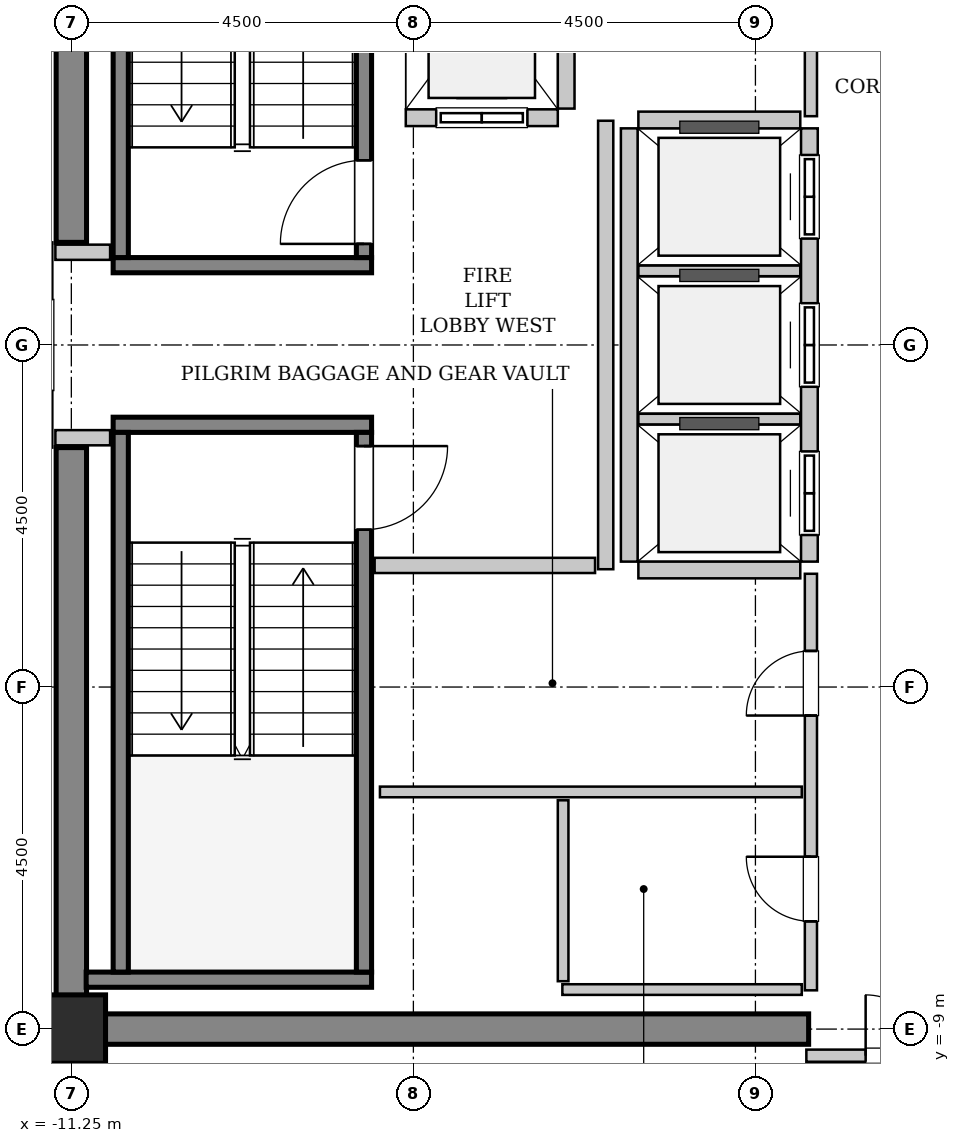
"""IFC4 building model, lengths in metres.
Left out: names, types, materials, properties, quantities, classifications, styles, units other than length and angle.
Written with IfcOpenShell. Run it as: python <this file> out.ifc"""

import sys

from ifc_helpers import new_model, si_unit, direction, frame, frame_2d, origin, origin_2d, place, context, subcontext, project, spatial, rectangle, extrude, source, transform, mapped, element, fill, save


model = new_model("IFC4")
c1 = context("Model", 3, precision=1e-05, world=origin(), true_north=direction((0.0, 1.0)))
c2 = subcontext(c1, "Body", "Model", "MODEL_VIEW")
j1 = project(units=[si_unit("LENGTHUNIT", "METRE"), si_unit("PLANEANGLEUNIT", "RADIAN")], contexts=[c1])
p1 = place(None, origin())
s1 = spatial("IfcSite", under=j1, at=p1, CompositionType="ELEMENT")
p2 = place(p1, origin())
s2 = spatial("IfcBuilding", under=s1, at=p2, CompositionType="ELEMENT")
p3 = place(p2, frame((0.0, 0.0, 337.6)))
s3 = spatial("IfcBuildingStorey", under=s2, at=p3, CompositionType="ELEMENT", Elevation=337.6)
m1 = source(origin(), c2, "Body", "SweptSolid", [
    extrude(rectangle(XDim=9.9, YDim=0.4, at=frame_2d((4.95, 0.0))), origin(), (0.0, 0.0, 1.0), 3.8),
])
p4 = place(p3, frame((-11.45, -9.0, 0.0), z_axis=(0.0, 0.0, 1.0), x_axis=(1.0, 0.0, 0.0)))
e1 = element("IfcWall", 1, at=p4, inside=s3, PredefinedType="SHEAR", context=c2, shape_type="MappedRepresentation", body=[
    mapped(m1, transform((0.0, 0.0, 0.0), x_axis=(1.0, 0.0, 0.0), y_axis=(0.0, 1.0, 0.0), z_axis=(0.0, 0.0, 1.0), scale=1.0)),
])
m2 = source(origin(), c2, "Body", "SweptSolid", [
    extrude(rectangle(XDim=7.45, YDim=0.4, at=frame_2d((3.725, 0.0))), origin(), (0.0, 0.0, 1.0), 3.8),
])
for number, where, z_axis, x_axis in (
    (2, (-11.25, -8.8, 0.0), (0.0, 0.0, 1.0), (0.0, 1.0, 0.0)),
    (3, (-11.25, 1.35, 0.0), (0.0, 0.0, 1.0), (0.0, 1.0, 0.0)),
):
    element("IfcWall", number, at=place(p3, frame(where, z_axis=z_axis, x_axis=x_axis)), inside=s3, PredefinedType="SHEAR", context=c2, shape_type="MappedRepresentation", body=[
        mapped(m2, transform((0.0, 0.0, 0.0), x_axis=(1.0, 0.0, 0.0), y_axis=(0.0, 1.0, 0.0), z_axis=(0.0, 0.0, 1.0), scale=1.0)),
    ])
m3 = source(origin(), c2, "Body", "SweptSolid", [
    extrude(rectangle(XDim=0.9, YDim=0.9, at=origin_2d()), origin(), (0.0, 0.0, 1.0), 3.8),
])
p5 = place(p3, frame((-11.25, -9.0, 0.0), z_axis=(0.0, 0.0, 1.0), x_axis=(1.0, 0.0, 0.0)))
e4 = element("IfcColumn", 4, at=p5, inside=s3, PredefinedType="COLUMN", context=c2, shape_type="MappedRepresentation", body=[
    mapped(m3, transform((0.0, 0.0, 0.0), x_axis=(1.0, 0.0, 0.0), y_axis=(0.0, 1.0, 0.0), z_axis=(0.0, 0.0, 1.0), scale=1.0)),
])
m4 = source(origin(), c2, "Body", "SweptSolid", [
    extrude(rectangle(XDim=3.4, YDim=0.2, at=frame_2d((1.7, 0.0))), origin(), (0.0, 0.0, 1.0), 3.8),
])
p6 = place(p3, frame((-7.3, 1.05, 0.0), z_axis=(0.0, 0.0, 1.0), x_axis=(-1.0, 0.0, 0.0)))
e5 = element("IfcWall", 5, at=p6, inside=s3, PredefinedType="SOLIDWALL", context=c2, shape_type="MappedRepresentation", body=[
    mapped(m4, transform((0.0, 0.0, 0.0), x_axis=(1.0, 0.0, 0.0), y_axis=(0.0, 1.0, 0.0), z_axis=(0.0, 0.0, 1.0), scale=1.0)),
])
m5 = source(origin(), c2, "Body", "SweptSolid", [
    extrude(rectangle(XDim=7.1, YDim=0.2, at=frame_2d((3.55, 0.0))), origin(), (0.0, 0.0, 1.0), 3.8),
])
p7 = place(p3, frame((-7.4, 1.15, 0.0), z_axis=(0.0, 0.0, 1.0), x_axis=(0.0, 1.0, 0.0)))
e6 = element("IfcWall", 6, at=p7, inside=s3, PredefinedType="SOLIDWALL", context=c2, shape_type="MappedRepresentation", body=[
    mapped(m5, transform((0.0, 0.0, 0.0), x_axis=(1.0, 0.0, 0.0), y_axis=(0.0, 1.0, 0.0), z_axis=(0.0, 0.0, 1.0), scale=1.0)),
])
p8 = place(p7, frame((0.18, 0.0, 0.0)))
e7 = element("IfcOpeningElement", 7, at=p8, cuts=e6, PredefinedType="OPENING", context=c2, shape_type="SweptSolid", body=[
    extrude(rectangle(XDim=1.1, YDim=2.15, at=frame_2d((0.55, 1.075))), frame((0.0, 0.11, 0.0), z_axis=(0.0, -1.0, 0.0), x_axis=(1.0, 0.0, 0.0)), (0.0, 0.0, 1.0), 0.22),
])
p9 = place(p3, frame((-10.6, 1.15, 0.0), z_axis=(0.0, 0.0, 1.0), x_axis=(0.0, 1.0, 0.0)))
e8 = element("IfcWall", 8, at=p9, inside=s3, PredefinedType="SOLIDWALL", context=c2, shape_type="MappedRepresentation", body=[
    mapped(m5, transform((0.0, 0.0, 0.0), x_axis=(1.0, 0.0, 0.0), y_axis=(0.0, 1.0, 0.0), z_axis=(0.0, 0.0, 1.0), scale=1.0)),
])
p10 = place(p3, frame((-10.7, -1.05, 0.0), z_axis=(0.0, 0.0, 1.0), x_axis=(1.0, 0.0, 0.0)))
e9 = element("IfcWall", 9, at=p10, inside=s3, PredefinedType="SOLIDWALL", context=c2, shape_type="MappedRepresentation", body=[
    mapped(m4, transform((0.0, 0.0, 0.0), x_axis=(1.0, 0.0, 0.0), y_axis=(0.0, 1.0, 0.0), z_axis=(0.0, 0.0, 1.0), scale=1.0)),
])
m6 = source(origin(), c2, "Body", "SweptSolid", [
    extrude(rectangle(XDim=3.755, YDim=0.2, at=frame_2d((1.877, 0.0))), origin(), (0.0, 0.0, 1.0), 3.8),
])
p11 = place(p3, frame((-11.055, -8.35, 0.0), z_axis=(0.0, 0.0, 1.0), x_axis=(1.0, 0.0, 0.0)))
e10 = element("IfcWall", 10, at=p11, inside=s3, PredefinedType="SOLIDWALL", context=c2, shape_type="MappedRepresentation", body=[
    mapped(m6, transform((0.0, 0.0, 0.0), x_axis=(1.0, 0.0, 0.0), y_axis=(0.0, 1.0, 0.0), z_axis=(0.0, 0.0, 1.0), scale=1.0)),
])
p12 = place(p3, frame((-10.6, -1.15, 0.0), z_axis=(0.0, 0.0, 1.0), x_axis=(0.0, -1.0, 0.0)))
e11 = element("IfcWall", 11, at=p12, inside=s3, PredefinedType="SOLIDWALL", context=c2, shape_type="MappedRepresentation", body=[
    mapped(m5, transform((0.0, 0.0, 0.0), x_axis=(1.0, 0.0, 0.0), y_axis=(0.0, 1.0, 0.0), z_axis=(0.0, 0.0, 1.0), scale=1.0)),
])
p13 = place(p3, frame((-7.4, -1.15, 0.0), z_axis=(0.0, 0.0, 1.0), x_axis=(0.0, -1.0, 0.0)))
e12 = element("IfcWall", 12, at=p13, inside=s3, PredefinedType="SOLIDWALL", context=c2, shape_type="MappedRepresentation", body=[
    mapped(m5, transform((0.0, 0.0, 0.0), x_axis=(1.0, 0.0, 0.0), y_axis=(0.0, 1.0, 0.0), z_axis=(0.0, 0.0, 1.0), scale=1.0)),
])
p14 = place(p13, frame((0.18, 0.0, 0.0)))
e13 = element("IfcOpeningElement", 13, at=p14, cuts=e12, PredefinedType="OPENING", context=c2, shape_type="SweptSolid", body=[
    extrude(rectangle(XDim=1.1, YDim=2.15, at=frame_2d((0.55, 1.075))), frame((0.0, 0.11, 0.0), z_axis=(0.0, -1.0, 0.0), x_axis=(1.0, 0.0, 0.0)), (0.0, 0.0, 1.0), 0.22),
])
m7 = source(origin(), c2, "Body", "SweptSolid", [
    extrude(rectangle(XDim=2.0, YDim=0.22, at=frame_2d((1.0, 0.0))), origin(), (0.0, 0.0, 1.0), 3.535),
])
p15 = place(p3, frame((-6.85, 2.99, 0.0), z_axis=(0.0, 0.0, 1.0), x_axis=(1.0, 0.0, 0.0)))
e14 = element("IfcWall", 14, at=p15, inside=s3, PredefinedType="SOLIDWALL", context=c2, shape_type="MappedRepresentation", body=[
    mapped(m7, transform((0.0, 0.0, 0.0), x_axis=(1.0, 0.0, 0.0), y_axis=(0.0, 1.0, 0.0), z_axis=(0.0, 0.0, 1.0), scale=1.0)),
])
p16 = place(p15, frame((0.4, 0.0, 0.0)))
e15 = element("IfcOpeningElement", 15, at=p16, cuts=e14, PredefinedType="OPENING", context=c2, shape_type="SweptSolid", body=[
    extrude(rectangle(XDim=1.2, YDim=2.2, at=frame_2d((0.6, 1.1))), frame((0.0, 0.12, 0.0), z_axis=(0.0, -1.0, 0.0), x_axis=(1.0, 0.0, 0.0)), (0.0, 0.0, 1.0), 0.24),
])
m8 = source(origin(), c2, "Body", "SweptSolid", [
    extrude(rectangle(XDim=2.68, YDim=0.22, at=frame_2d((1.34, 0.0))), origin(), (0.0, 0.0, 1.0), 3.535),
])
p17 = place(p3, frame((-4.74, 3.11, 0.0), z_axis=(0.0, 0.0, 1.0), x_axis=(0.0, 1.0, 0.0)))
e16 = element("IfcWall", 16, at=p17, inside=s3, PredefinedType="SOLIDWALL", context=c2, shape_type="MappedRepresentation", body=[
    mapped(m8, transform((0.0, 0.0, 0.0), x_axis=(1.0, 0.0, 0.0), y_axis=(0.0, 1.0, 0.0), z_axis=(0.0, 0.0, 1.0), scale=1.0)),
])
m9 = source(origin(), c2, "Body", "SweptSolid", [
    extrude(rectangle(XDim=5.7, YDim=0.22, at=frame_2d((2.85, 0.0))), origin(), (0.0, 0.0, 1.0), 3.535),
])
p18 = place(p3, frame((-1.54, -2.85, 0.0), z_axis=(0.0, 0.0, 1.0), x_axis=(0.0, 1.0, 0.0)))
e17 = element("IfcWall", 17, at=p18, inside=s3, PredefinedType="SOLIDWALL", context=c2, shape_type="MappedRepresentation", body=[
    mapped(m9, transform((0.0, 0.0, 0.0), x_axis=(1.0, 0.0, 0.0), y_axis=(0.0, 1.0, 0.0), z_axis=(0.0, 0.0, 1.0), scale=1.0)),
])
p19 = place(p18, frame((0.35, 0.0, 0.0)))
e18 = element("IfcOpeningElement", 18, at=p19, cuts=e17, PredefinedType="OPENING", context=c2, shape_type="SweptSolid", body=[
    extrude(rectangle(XDim=1.1, YDim=2.2, at=frame_2d((0.55, 1.1))), frame((0.0, 0.12, 0.0), z_axis=(0.0, -1.0, 0.0), x_axis=(1.0, 0.0, 0.0)), (0.0, 0.0, 1.0), 0.24),
])
p20 = place(p18, frame((2.3, 0.0, 0.0)))
e19 = element("IfcOpeningElement", 19, at=p20, cuts=e17, PredefinedType="OPENING", context=c2, shape_type="SweptSolid", body=[
    extrude(rectangle(XDim=1.1, YDim=2.2, at=frame_2d((0.55, 1.1))), frame((0.0, 0.12, 0.0), z_axis=(0.0, -1.0, 0.0), x_axis=(1.0, 0.0, 0.0)), (0.0, 0.0, 1.0), 0.24),
])
p21 = place(p18, frame((4.25, 0.0, 0.0)))
e20 = element("IfcOpeningElement", 20, at=p21, cuts=e17, PredefinedType="OPENING", context=c2, shape_type="SweptSolid", body=[
    extrude(rectangle(XDim=1.1, YDim=2.2, at=frame_2d((0.55, 1.1))), frame((0.0, 0.12, 0.0), z_axis=(0.0, -1.0, 0.0), x_axis=(1.0, 0.0, 0.0)), (0.0, 0.0, 1.0), 0.24),
])
p22 = place(p3, frame((-3.91, 2.85, 0.0), z_axis=(0.0, 0.0, 1.0), x_axis=(0.0, -1.0, 0.0)))
e21 = element("IfcWall", 21, at=p22, inside=s3, PredefinedType="SOLIDWALL", context=c2, shape_type="MappedRepresentation", body=[
    mapped(m9, transform((0.0, 0.0, 0.0), x_axis=(1.0, 0.0, 0.0), y_axis=(0.0, 1.0, 0.0), z_axis=(0.0, 0.0, 1.0), scale=1.0)),
])
m10 = source(origin(), c2, "Body", "SweptSolid", [
    extrude(rectangle(XDim=2.13, YDim=0.22, at=frame_2d((1.065, 0.0))), origin(), (0.0, 0.0, 1.0), 3.535),
])
p23 = place(p3, frame((-3.79, -2.96, 0.0), z_axis=(0.0, 0.0, 1.0), x_axis=(1.0, 0.0, 0.0)))
e22 = element("IfcWall", 22, at=p23, inside=s3, PredefinedType="SOLIDWALL", context=c2, shape_type="MappedRepresentation", body=[
    mapped(m10, transform((0.0, 0.0, 0.0), x_axis=(1.0, 0.0, 0.0), y_axis=(0.0, 1.0, 0.0), z_axis=(0.0, 0.0, 1.0), scale=1.0)),
])
m11 = source(origin(), c2, "Body", "SweptSolid", [
    extrude(rectangle(XDim=2.13, YDim=0.14, at=frame_2d((1.065, 0.0))), origin(), (0.0, 0.0, 1.0), 3.535),
])
for number, where, z_axis, x_axis in (
    (23, (-3.79, -0.975, 0.0), (0.0, 0.0, 1.0), (1.0, 0.0, 0.0)),
    (24, (-3.79, 0.975, 0.0), (0.0, 0.0, 1.0), (1.0, 0.0, 0.0)),
):
    element("IfcWall", number, at=place(p3, frame(where, z_axis=z_axis, x_axis=x_axis)), inside=s3, PredefinedType="PARTITIONING", context=c2, shape_type="MappedRepresentation", body=[
        mapped(m11, transform((0.0, 0.0, 0.0), x_axis=(1.0, 0.0, 0.0), y_axis=(0.0, 1.0, 0.0), z_axis=(0.0, 0.0, 1.0), scale=1.0)),
    ])
p24 = place(p3, frame((-1.66, 2.96, 0.0), z_axis=(0.0, 0.0, 1.0), x_axis=(-1.0, 0.0, 0.0)))
e25 = element("IfcWall", 25, at=p24, inside=s3, PredefinedType="SOLIDWALL", context=c2, shape_type="MappedRepresentation", body=[
    mapped(m10, transform((0.0, 0.0, 0.0), x_axis=(1.0, 0.0, 0.0), y_axis=(0.0, 1.0, 0.0), z_axis=(0.0, 0.0, 1.0), scale=1.0)),
])
m12 = source(origin(), c2, "Body", "SweptSolid", [
    extrude(rectangle(XDim=5.9, YDim=0.2, at=frame_2d((2.95, 0.0))), origin(), (0.0, 0.0, 1.0), 3.535),
])
p25 = place(p3, frame((-4.22, -2.95, 0.0), z_axis=(0.0, 0.0, 1.0), x_axis=(0.0, 1.0, 0.0)))
e26 = element("IfcWall", 26, at=p25, inside=s3, PredefinedType="PARTITIONING", context=c2, shape_type="MappedRepresentation", body=[
    mapped(m12, transform((0.0, 0.0, 0.0), x_axis=(1.0, 0.0, 0.0), y_axis=(0.0, 1.0, 0.0), z_axis=(0.0, 0.0, 1.0), scale=1.0)),
])
m13 = source(origin(), c2, "Body", "SweptSolid", [
    extrude(rectangle(XDim=2.9, YDim=0.2, at=frame_2d((1.45, 0.0))), origin(), (0.0, 0.0, 1.0), 3.535),
])
p26 = place(p3, frame((-7.26, -2.9, 0.0), z_axis=(0.0, 0.0, 1.0), x_axis=(1.0, 0.0, 0.0)))
e27 = element("IfcWall", 27, at=p26, inside=s3, PredefinedType="PARTITIONING", context=c2, shape_type="MappedRepresentation", body=[
    mapped(m13, transform((0.0, 0.0, 0.0), x_axis=(1.0, 0.0, 0.0), y_axis=(0.0, 1.0, 0.0), z_axis=(0.0, 0.0, 1.0), scale=1.0)),
])
m14 = source(origin(), c2, "Body", "SweptSolid", [
    extrude(rectangle(XDim=0.72, YDim=0.2, at=frame_2d((0.36, 0.0))), origin(), (0.0, 0.0, 1.0), 3.535),
])
for number, where, z_axis, x_axis in (
    (28, (-11.46, 1.22, 0.0), (0.0, 0.0, 1.0), (1.0, 0.0, 0.0)),
    (29, (-11.46, -1.22, 0.0), (0.0, 0.0, 1.0), (1.0, 0.0, 0.0)),
):
    element("IfcWall", number, at=place(p3, frame(where, z_axis=z_axis, x_axis=x_axis)), inside=s3, PredefinedType="PARTITIONING", context=c2, shape_type="MappedRepresentation", body=[
        mapped(m14, transform((0.0, 0.0, 0.0), x_axis=(1.0, 0.0, 0.0), y_axis=(0.0, 1.0, 0.0), z_axis=(0.0, 0.0, 1.0), scale=1.0)),
    ])
m15 = source(origin(), c2, "Body", "SweptSolid", [
    extrude(rectangle(XDim=3.16, YDim=0.16, at=frame_2d((1.58, 0.0))), origin(), (0.0, 0.0, 1.0), 2.625),
])
p27 = place(p3, frame((-1.58, -9.35, 0.0), z_axis=(0.0, 0.0, 1.0), x_axis=(1.0, 0.0, 0.0)))
e30 = element("IfcWall", 30, at=p27, inside=s3, PredefinedType="PARTITIONING", context=c2, shape_type="MappedRepresentation", body=[
    mapped(m15, transform((0.0, 0.0, 0.0), x_axis=(1.0, 0.0, 0.0), y_axis=(0.0, 1.0, 0.0), z_axis=(0.0, 0.0, 1.0), scale=1.0)),
])
p28 = place(p27, frame((0.78, 0.0, 0.0)))
e31 = element("IfcOpeningElement", 31, at=p28, cuts=e30, PredefinedType="OPENING", context=c2, shape_type="SweptSolid", body=[
    extrude(rectangle(XDim=1.6, YDim=2.3, at=frame_2d((0.8, 1.15))), frame((0.0, 0.09, 0.0), z_axis=(0.0, -1.0, 0.0), x_axis=(1.0, 0.0, 0.0)), (0.0, 0.0, 1.0), 0.18),
])
m16 = source(origin(), c2, "Body", "SweptSolid", [
    extrude(rectangle(XDim=5.48, YDim=0.16, at=frame_2d((2.74, 0.0))), origin(), (0.0, 0.0, 1.0), 3.535),
])
p29 = place(p3, frame((-1.52, 3.01, 0.0), z_axis=(0.0, 0.0, 1.0), x_axis=(0.0, 1.0, 0.0)))
e32 = element("IfcWall", 32, at=p29, inside=s3, PredefinedType="PARTITIONING", context=c2, shape_type="MappedRepresentation", body=[
    mapped(m16, transform((0.0, 0.0, 0.0), x_axis=(1.0, 0.0, 0.0), y_axis=(0.0, 1.0, 0.0), z_axis=(0.0, 0.0, 1.0), scale=1.0)),
])
p30 = place(p29, frame((2.315, 0.0, 0.0)))
e33 = element("IfcOpeningElement", 33, at=p30, cuts=e32, PredefinedType="OPENING", context=c2, shape_type="SweptSolid", body=[
    extrude(rectangle(XDim=0.85, YDim=2.1, at=frame_2d((0.425, 1.05))), frame((0.0, 0.09, 0.0), z_axis=(0.0, -1.0, 0.0), x_axis=(1.0, 0.0, 0.0)), (0.0, 0.0, 1.0), 0.18),
])
p31 = place(p3, frame((-1.52, -8.49, 0.0), z_axis=(0.0, 0.0, 1.0), x_axis=(0.0, 1.0, 0.0)))
e34 = element("IfcWall", 34, at=p31, inside=s3, PredefinedType="PARTITIONING", context=c2, shape_type="MappedRepresentation", body=[
    mapped(m16, transform((0.0, 0.0, 0.0), x_axis=(1.0, 0.0, 0.0), y_axis=(0.0, 1.0, 0.0), z_axis=(0.0, 0.0, 1.0), scale=1.0)),
])
p32 = place(p31, frame((0.907, 0.0, 0.0)))
e35 = element("IfcOpeningElement", 35, at=p32, cuts=e34, PredefinedType="OPENING", context=c2, shape_type="SweptSolid", body=[
    extrude(rectangle(XDim=0.85, YDim=2.1, at=frame_2d((0.425, 1.05))), frame((0.0, 0.09, 0.0), z_axis=(0.0, -1.0, 0.0), x_axis=(1.0, 0.0, 0.0)), (0.0, 0.0, 1.0), 0.18),
])
p33 = place(p31, frame((3.615, 0.0, 0.0)))
e36 = element("IfcOpeningElement", 36, at=p33, cuts=e34, PredefinedType="OPENING", context=c2, shape_type="SweptSolid", body=[
    extrude(rectangle(XDim=0.85, YDim=2.1, at=frame_2d((0.425, 1.05))), frame((0.0, 0.09, 0.0), z_axis=(0.0, -1.0, 0.0), x_axis=(1.0, 0.0, 0.0)), (0.0, 0.0, 1.0), 0.18),
])
m17 = source(origin(), c2, "Body", "SweptSolid", [
    extrude(rectangle(XDim=5.55, YDim=0.14, at=frame_2d((2.775, 0.0))), origin(), (0.0, 0.0, 1.0), 3.535),
])
p34 = place(p3, frame((-7.19, -5.88, 0.0), z_axis=(0.0, 0.0, 1.0), x_axis=(1.0, 0.0, 0.0)))
e37 = element("IfcWall", 37, at=p34, inside=s3, PredefinedType="PARTITIONING", context=c2, shape_type="MappedRepresentation", body=[
    mapped(m17, transform((0.0, 0.0, 0.0), x_axis=(1.0, 0.0, 0.0), y_axis=(0.0, 1.0, 0.0), z_axis=(0.0, 0.0, 1.0), scale=1.0)),
])
m18 = source(origin(), c2, "Body", "SweptSolid", [
    extrude(rectangle(XDim=3.15, YDim=0.14, at=frame_2d((1.575, 0.0))), origin(), (0.0, 0.0, 1.0), 3.535),
])
p35 = place(p3, frame((-4.79, -8.48, 0.0), z_axis=(0.0, 0.0, 1.0), x_axis=(1.0, 0.0, 0.0)))
e38 = element("IfcWall", 38, at=p35, inside=s3, PredefinedType="PARTITIONING", context=c2, shape_type="MappedRepresentation", body=[
    mapped(m18, transform((0.0, 0.0, 0.0), x_axis=(1.0, 0.0, 0.0), y_axis=(0.0, 1.0, 0.0), z_axis=(0.0, 0.0, 1.0), scale=1.0)),
])
m19 = source(origin(), c2, "Body", "SweptSolid", [
    extrude(rectangle(XDim=2.38, YDim=0.14, at=frame_2d((1.19, 0.0))), origin(), (0.0, 0.0, 1.0), 3.535),
])
p36 = place(p3, frame((-4.78, -8.37, 0.0), z_axis=(0.0, 0.0, 1.0), x_axis=(0.0, 1.0, 0.0)))
e39 = element("IfcWall", 39, at=p36, inside=s3, PredefinedType="PARTITIONING", context=c2, shape_type="MappedRepresentation", body=[
    mapped(m19, transform((0.0, 0.0, 0.0), x_axis=(1.0, 0.0, 0.0), y_axis=(0.0, 1.0, 0.0), z_axis=(0.0, 0.0, 1.0), scale=1.0)),
])
m20 = source(origin(), c2, "Body", "SweptSolid", [
    extrude(rectangle(XDim=1.1, YDim=2.15, at=frame_2d((0.55, 1.075))), frame((0.0, 0.025, 0.0), z_axis=(0.0, -1.0, 0.0), x_axis=(1.0, 0.0, 0.0)), (0.0, 0.0, 1.0), 0.05),
])
p37 = place(p8, origin())
e40 = element("IfcDoor", 40, at=p37, inside=s3, OperationType="SINGLE_SWING_LEFT", PredefinedType="DOOR", context=c2, shape_type="MappedRepresentation", body=[
    mapped(m20, transform((0.0, 0.0, 0.0), x_axis=(1.0, 0.0, 0.0), y_axis=(0.0, 1.0, 0.0), z_axis=(0.0, 0.0, 1.0), scale=1.0)),
])
fill(e7, e40)
p38 = place(p14, origin())
e41 = element("IfcDoor", 41, at=p38, inside=s3, OperationType="SINGLE_SWING_LEFT", PredefinedType="DOOR", context=c2, shape_type="MappedRepresentation", body=[
    mapped(m20, transform((0.0, 0.0, 0.0), x_axis=(1.0, 0.0, 0.0), y_axis=(0.0, 1.0, 0.0), z_axis=(0.0, 0.0, 1.0), scale=1.0)),
])
fill(e13, e41)
m21 = source(origin(), c2, "Body", "SweptSolid", [
    extrude(rectangle(XDim=1.2, YDim=2.2, at=frame_2d((0.6, 1.1))), frame((0.0, 0.025, 0.0), z_axis=(0.0, -1.0, 0.0), x_axis=(1.0, 0.0, 0.0)), (0.0, 0.0, 1.0), 0.05),
])
p39 = place(p16, origin())
e42 = element("IfcDoor", 42, at=p39, inside=s3, OperationType="SLIDING_TO_LEFT", PredefinedType="DOOR", context=c2, shape_type="MappedRepresentation", body=[
    mapped(m21, transform((0.0, 0.0, 0.0), x_axis=(1.0, 0.0, 0.0), y_axis=(0.0, 1.0, 0.0), z_axis=(0.0, 0.0, 1.0), scale=1.0)),
])
fill(e15, e42)
m22 = source(origin(), c2, "Body", "SweptSolid", [
    extrude(rectangle(XDim=1.1, YDim=2.2, at=frame_2d((0.55, 1.1))), frame((0.0, 0.025, 0.0), z_axis=(0.0, -1.0, 0.0), x_axis=(1.0, 0.0, 0.0)), (0.0, 0.0, 1.0), 0.05),
])
p40 = place(p19, origin())
e43 = element("IfcDoor", 43, at=p40, inside=s3, OperationType="DOUBLE_DOOR_SLIDING", PredefinedType="DOOR", context=c2, shape_type="MappedRepresentation", body=[
    mapped(m22, transform((0.0, 0.0, 0.0), x_axis=(1.0, 0.0, 0.0), y_axis=(0.0, 1.0, 0.0), z_axis=(0.0, 0.0, 1.0), scale=1.0)),
])
fill(e18, e43)
p41 = place(p20, origin())
e44 = element("IfcDoor", 44, at=p41, inside=s3, OperationType="DOUBLE_DOOR_SLIDING", PredefinedType="DOOR", context=c2, shape_type="MappedRepresentation", body=[
    mapped(m22, transform((0.0, 0.0, 0.0), x_axis=(1.0, 0.0, 0.0), y_axis=(0.0, 1.0, 0.0), z_axis=(0.0, 0.0, 1.0), scale=1.0)),
])
fill(e19, e44)
p42 = place(p21, origin())
e45 = element("IfcDoor", 45, at=p42, inside=s3, OperationType="DOUBLE_DOOR_SLIDING", PredefinedType="DOOR", context=c2, shape_type="MappedRepresentation", body=[
    mapped(m22, transform((0.0, 0.0, 0.0), x_axis=(1.0, 0.0, 0.0), y_axis=(0.0, 1.0, 0.0), z_axis=(0.0, 0.0, 1.0), scale=1.0)),
])
fill(e20, e45)
m23 = source(origin(), c2, "Body", "SweptSolid", [
    extrude(rectangle(XDim=1.6, YDim=2.3, at=frame_2d((0.8, 1.15))), frame((0.0, 0.025, 0.0), z_axis=(0.0, -1.0, 0.0), x_axis=(1.0, 0.0, 0.0)), (0.0, 0.0, 1.0), 0.05),
])
p43 = place(p28, origin())
e46 = element("IfcDoor", 46, at=p43, inside=s3, OperationType="DOUBLE_DOOR_SINGLE_SWING", PredefinedType="DOOR", context=c2, shape_type="MappedRepresentation", body=[
    mapped(m23, transform((0.0, 0.0, 0.0), x_axis=(1.0, 0.0, 0.0), y_axis=(0.0, 1.0, 0.0), z_axis=(0.0, 0.0, 1.0), scale=1.0)),
])
fill(e31, e46)
m24 = source(origin(), c2, "Body", "SweptSolid", [
    extrude(rectangle(XDim=0.85, YDim=2.1, at=frame_2d((0.425, 1.05))), frame((0.0, 0.025, 0.0), z_axis=(0.0, -1.0, 0.0), x_axis=(1.0, 0.0, 0.0)), (0.0, 0.0, 1.0), 0.05),
])
p44 = place(p32, origin())
e47 = element("IfcDoor", 47, at=p44, inside=s3, OperationType="SINGLE_SWING_RIGHT", PredefinedType="DOOR", context=c2, shape_type="MappedRepresentation", body=[
    mapped(m24, transform((0.0, 0.0, 0.0), x_axis=(1.0, 0.0, 0.0), y_axis=(0.0, 1.0, 0.0), z_axis=(0.0, 0.0, 1.0), scale=1.0)),
])
fill(e35, e47)
p45 = place(p33, origin())
e48 = element("IfcDoor", 48, at=p45, inside=s3, OperationType="SINGLE_SWING_LEFT", PredefinedType="DOOR", context=c2, shape_type="MappedRepresentation", body=[
    mapped(m24, transform((0.0, 0.0, 0.0), x_axis=(1.0, 0.0, 0.0), y_axis=(0.0, 1.0, 0.0), z_axis=(0.0, 0.0, 1.0), scale=1.0)),
])
fill(e36, e48)
save(model, sys.argv[1])
